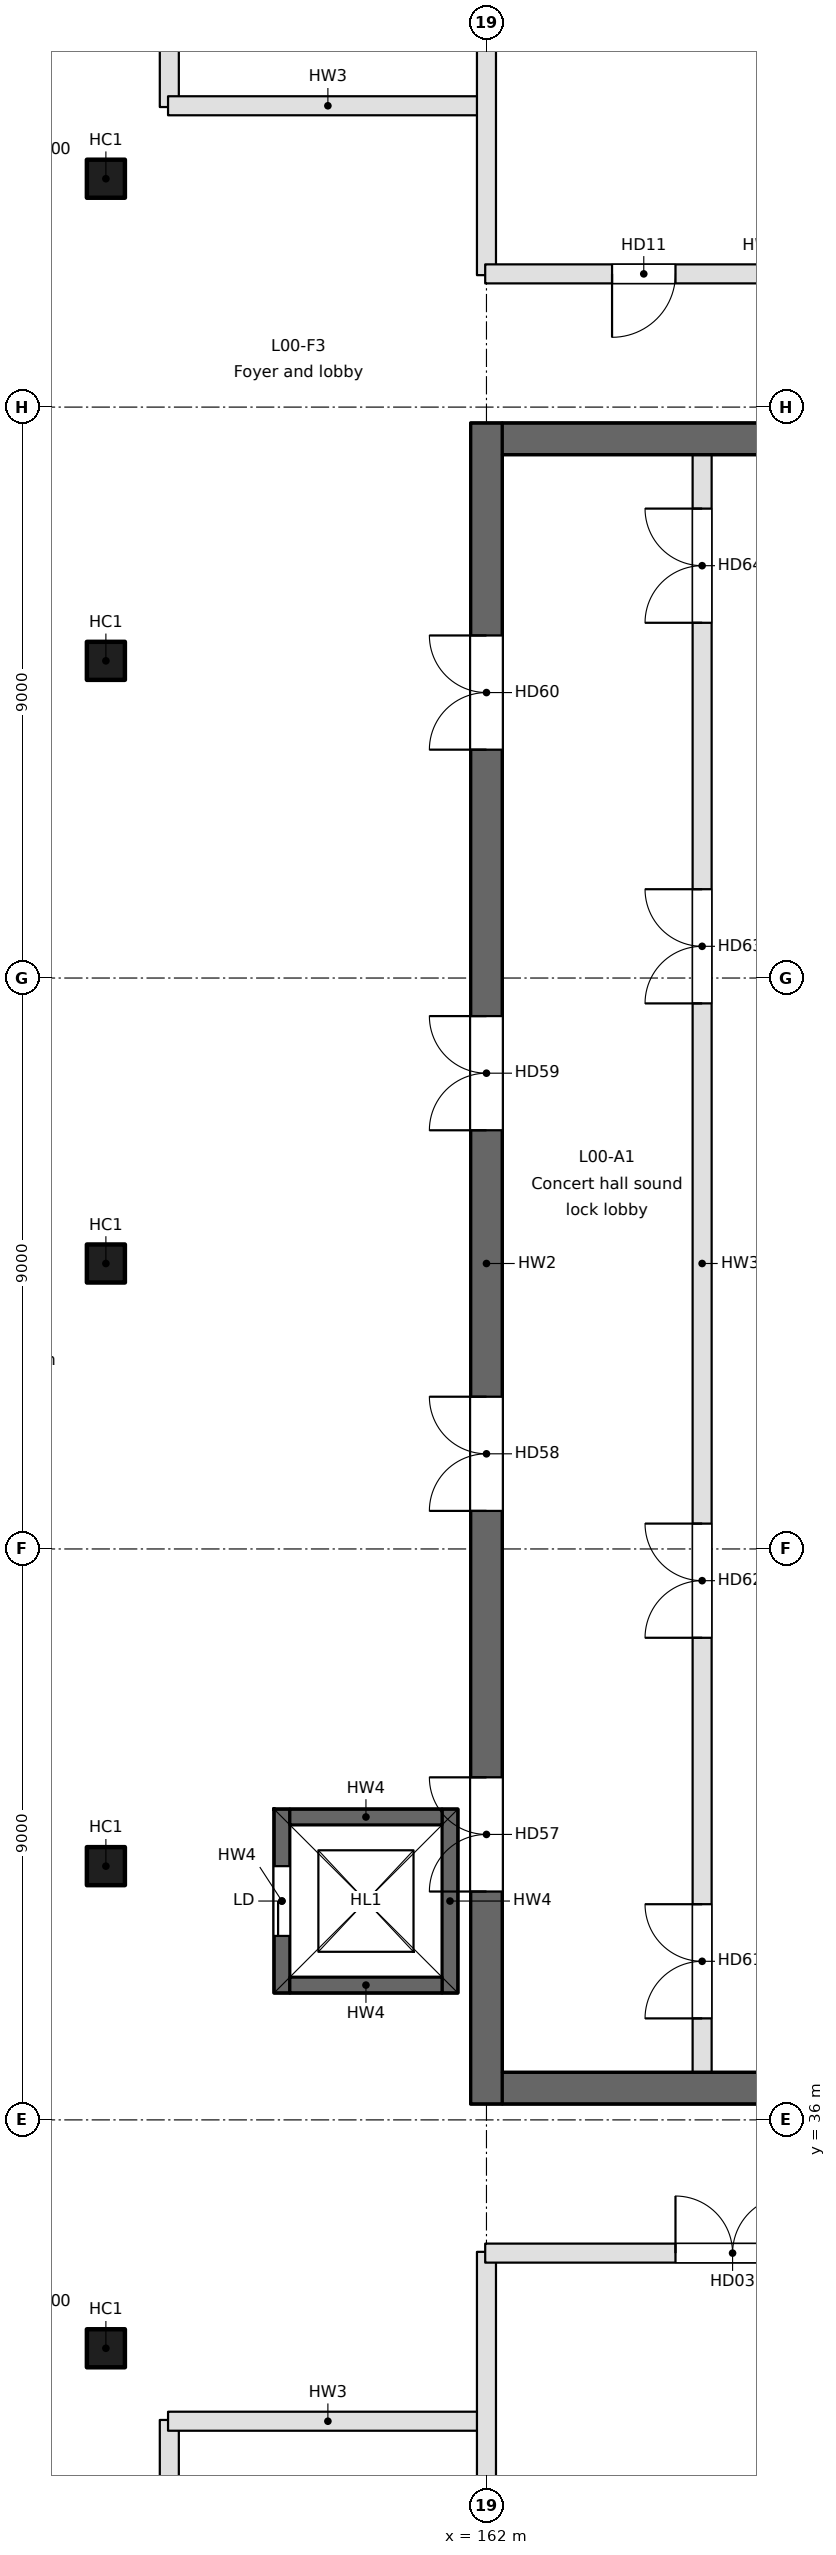
"""IFC4 building model, lengths in metres.
Left out: names, types, materials, properties, quantities, classifications, styles, units other than length and angle.
Written with IfcOpenShell. Run it as: python <this file> out.ifc"""

import sys

from ifc_helpers import new_model, si_unit, direction, frame, frame_2d, origin, origin_2d, place, context, subcontext, project, spatial, rectangle, extrude, element, fill, save


model = new_model("IFC4")
c1 = context("Model", 3, precision=1e-05, world=origin(), true_north=direction((0.0, 1.0)))
c2 = subcontext(c1, "Body", "Model", "MODEL_VIEW")
j1 = project(units=[si_unit("LENGTHUNIT", "METRE"), si_unit("PLANEANGLEUNIT", "RADIAN")], contexts=[c1])
p1 = place(None, origin())
s1 = spatial("IfcSite", under=j1, at=p1, CompositionType="ELEMENT")
p2 = place(p1, origin())
s2 = spatial("IfcBuilding", under=s1, at=p2, CompositionType="ELEMENT")
p3 = place(p2, origin())
s3 = spatial("IfcBuildingStorey", under=s2, at=p3, CompositionType="ELEMENT", Elevation=0.0)
for number, where, z_axis, x_axis in (
    (1, (156.0, 32.4, -1.8), (0.0, 0.0, 1.0), (1.0, 0.0, 0.0)),
    (2, (156.0, 40.0, -1.8), (0.0, 0.0, 1.0), (1.0, 0.0, 0.0)),
    (3, (156.0, 49.5, -1.8), (0.0, 0.0, 1.0), (1.0, 0.0, 0.0)),
    (4, (156.0, 59.0, -1.8), (0.0, 0.0, 1.0), (1.0, 0.0, 0.0)),
    (5, (156.0, 66.6, -1.8), (0.0, 0.0, 1.0), (1.0, 0.0, 0.0)),
):
    element("IfcColumn", number, at=place(p3, frame(where, z_axis=z_axis, x_axis=x_axis)), inside=s3, PredefinedType="COLUMN", context=c2, shape_type="SweptSolid", body=[
        extrude(rectangle(XDim=0.6, YDim=0.6, at=origin_2d()), origin(), (0.0, 0.0, 1.0), 7.8),
    ])
p4 = place(p3, frame((162.0, 36.25, -1.8), z_axis=(0.0, 0.0, 1.0), x_axis=(0.0, 1.0, 0.0)))
e6 = element("IfcWall", 6, at=p4, inside=s3, PredefinedType="SOLIDWALL", context=c2, shape_type="SweptSolid", body=[
    extrude(rectangle(XDim=26.5, YDim=0.5, at=frame_2d((13.25, 0.0))), origin(), (0.0, 0.0, 1.0), 7.45),
])
p5 = place(p4, frame((3.35, 0.0, 1.8)))
e7 = element("IfcOpeningElement", 7, at=p5, cuts=e6, PredefinedType="OPENING", context=c2, shape_type="SweptSolid", body=[
    extrude(rectangle(XDim=1.8, YDim=2.4, at=frame_2d((0.9, 1.2))), frame((0.0, 0.25, 0.0), z_axis=(0.0, -1.0, 0.0), x_axis=(1.0, 0.0, 0.0)), (0.0, 0.0, 1.0), 0.5),
])
p6 = place(p4, frame((9.35, 0.0, 1.8)))
e8 = element("IfcOpeningElement", 8, at=p6, cuts=e6, PredefinedType="OPENING", context=c2, shape_type="SweptSolid", body=[
    extrude(rectangle(XDim=1.8, YDim=2.4, at=frame_2d((0.9, 1.2))), frame((0.0, 0.25, 0.0), z_axis=(0.0, -1.0, 0.0), x_axis=(1.0, 0.0, 0.0)), (0.0, 0.0, 1.0), 0.5),
])
p7 = place(p4, frame((15.35, 0.0, 1.8)))
e9 = element("IfcOpeningElement", 9, at=p7, cuts=e6, PredefinedType="OPENING", context=c2, shape_type="SweptSolid", body=[
    extrude(rectangle(XDim=1.8, YDim=2.4, at=frame_2d((0.9, 1.2))), frame((0.0, 0.25, 0.0), z_axis=(0.0, -1.0, 0.0), x_axis=(1.0, 0.0, 0.0)), (0.0, 0.0, 1.0), 0.5),
])
p8 = place(p4, frame((21.35, 0.0, 1.8)))
e10 = element("IfcOpeningElement", 10, at=p8, cuts=e6, PredefinedType="OPENING", context=c2, shape_type="SweptSolid", body=[
    extrude(rectangle(XDim=1.8, YDim=2.4, at=frame_2d((0.9, 1.2))), frame((0.0, 0.25, 0.0), z_axis=(0.0, -1.0, 0.0), x_axis=(1.0, 0.0, 0.0)), (0.0, 0.0, 1.0), 0.5),
])
p9 = place(p3, frame((209.6, 36.5, -1.8), z_axis=(0.0, 0.0, 1.0), x_axis=(-1.0, 0.0, 0.0)))
e11 = element("IfcWall", 11, at=p9, inside=s3, PredefinedType="SOLIDWALL", context=c2, shape_type="SweptSolid", body=[
    extrude(rectangle(XDim=47.35, YDim=0.5, at=frame_2d((23.675, 0.0))), origin(), (0.0, 0.0, 1.0), 7.45),
])
p10 = place(p9, frame((40.7, 0.0, 1.8)))
e12 = element("IfcOpeningElement", 12, at=p10, cuts=e11, PredefinedType="OPENING", context=c2, shape_type="SweptSolid", body=[
    extrude(rectangle(XDim=1.8, YDim=2.4, at=frame_2d((0.9, 1.2))), frame((0.0, 0.25, 0.0), z_axis=(0.0, -1.0, 0.0), x_axis=(1.0, 0.0, 0.0)), (0.0, 0.0, 1.0), 0.5),
])
p11 = place(p9, frame((37.2, 0.0, 1.8)))
e13 = element("IfcOpeningElement", 13, at=p11, cuts=e11, PredefinedType="OPENING", context=c2, shape_type="SweptSolid", body=[
    extrude(rectangle(XDim=1.8, YDim=2.4, at=frame_2d((0.9, 1.2))), frame((0.0, 0.25, 0.0), z_axis=(0.0, -1.0, 0.0), x_axis=(1.0, 0.0, 0.0)), (0.0, 0.0, 1.0), 0.5),
])
p12 = place(p9, frame((33.7, 0.0, 1.8)))
e14 = element("IfcOpeningElement", 14, at=p12, cuts=e11, PredefinedType="OPENING", context=c2, shape_type="SweptSolid", body=[
    extrude(rectangle(XDim=1.8, YDim=2.4, at=frame_2d((0.9, 1.2))), frame((0.0, 0.25, 0.0), z_axis=(0.0, -1.0, 0.0), x_axis=(1.0, 0.0, 0.0)), (0.0, 0.0, 1.0), 0.5),
])
p13 = place(p9, frame((12.7, 0.0, 1.8)))
e15 = element("IfcOpeningElement", 15, at=p13, cuts=e11, PredefinedType="OPENING", context=c2, shape_type="SweptSolid", body=[
    extrude(rectangle(XDim=1.8, YDim=2.1, at=frame_2d((0.9, 1.05))), frame((0.0, 0.25, 0.0), z_axis=(0.0, -1.0, 0.0), x_axis=(1.0, 0.0, 0.0)), (0.0, 0.0, 1.0), 0.5),
])
p14 = place(p9, frame((4.7, 0.0, 1.8)))
e16 = element("IfcOpeningElement", 16, at=p14, cuts=e11, PredefinedType="OPENING", context=c2, shape_type="SweptSolid", body=[
    extrude(rectangle(XDim=1.8, YDim=2.1, at=frame_2d((0.9, 1.05))), frame((0.0, 0.25, 0.0), z_axis=(0.0, -1.0, 0.0), x_axis=(1.0, 0.0, 0.0)), (0.0, 0.0, 1.0), 0.5),
])
p15 = place(p3, frame((162.25, 62.5, -1.8), z_axis=(0.0, 0.0, 1.0), x_axis=(1.0, 0.0, 0.0)))
e17 = element("IfcWall", 17, at=p15, inside=s3, PredefinedType="SOLIDWALL", context=c2, shape_type="SweptSolid", body=[
    extrude(rectangle(XDim=47.35, YDim=0.5, at=frame_2d((23.675, 0.0))), origin(), (0.0, 0.0, 1.0), 7.45),
])
p16 = place(p15, frame((4.85, 0.0, 1.8)))
e18 = element("IfcOpeningElement", 18, at=p16, cuts=e17, PredefinedType="OPENING", context=c2, shape_type="SweptSolid", body=[
    extrude(rectangle(XDim=1.8, YDim=2.4, at=frame_2d((0.9, 1.2))), frame((0.0, 0.25, 0.0), z_axis=(0.0, -1.0, 0.0), x_axis=(1.0, 0.0, 0.0)), (0.0, 0.0, 1.0), 0.5),
])
p17 = place(p15, frame((8.35, 0.0, 1.8)))
e19 = element("IfcOpeningElement", 19, at=p17, cuts=e17, PredefinedType="OPENING", context=c2, shape_type="SweptSolid", body=[
    extrude(rectangle(XDim=1.8, YDim=2.4, at=frame_2d((0.9, 1.2))), frame((0.0, 0.25, 0.0), z_axis=(0.0, -1.0, 0.0), x_axis=(1.0, 0.0, 0.0)), (0.0, 0.0, 1.0), 0.5),
])
p18 = place(p15, frame((11.85, 0.0, 1.8)))
e20 = element("IfcOpeningElement", 20, at=p18, cuts=e17, PredefinedType="OPENING", context=c2, shape_type="SweptSolid", body=[
    extrude(rectangle(XDim=1.8, YDim=2.4, at=frame_2d((0.9, 1.2))), frame((0.0, 0.25, 0.0), z_axis=(0.0, -1.0, 0.0), x_axis=(1.0, 0.0, 0.0)), (0.0, 0.0, 1.0), 0.5),
])
p19 = place(p15, frame((32.85, 0.0, 1.8)))
e21 = element("IfcOpeningElement", 21, at=p19, cuts=e17, PredefinedType="OPENING", context=c2, shape_type="SweptSolid", body=[
    extrude(rectangle(XDim=1.8, YDim=2.1, at=frame_2d((0.9, 1.05))), frame((0.0, 0.25, 0.0), z_axis=(0.0, -1.0, 0.0), x_axis=(1.0, 0.0, 0.0)), (0.0, 0.0, 1.0), 0.5),
])
p20 = place(p15, frame((40.85, 0.0, 1.8)))
e22 = element("IfcOpeningElement", 22, at=p20, cuts=e17, PredefinedType="OPENING", context=c2, shape_type="SweptSolid", body=[
    extrude(rectangle(XDim=1.8, YDim=2.1, at=frame_2d((0.9, 1.05))), frame((0.0, 0.25, 0.0), z_axis=(0.0, -1.0, 0.0), x_axis=(1.0, 0.0, 0.0)), (0.0, 0.0, 1.0), 0.5),
])
p21 = place(p3, frame((165.4, 36.75, 0.0), z_axis=(0.0, 0.0, 1.0), x_axis=(0.0, 1.0, 0.0)))
e23 = element("IfcWall", 23, at=p21, inside=s3, PredefinedType="PARTITIONING", context=c2, shape_type="SweptSolid", body=[
    extrude(rectangle(XDim=25.5, YDim=0.3, at=frame_2d((12.75, 0.0))), origin(), (0.0, 0.0, 1.0), 5.65),
])
p22 = place(p21, frame((0.85, 0.0, 0.0)))
e24 = element("IfcOpeningElement", 24, at=p22, cuts=e23, PredefinedType="OPENING", context=c2, shape_type="SweptSolid", body=[
    extrude(rectangle(XDim=1.8, YDim=2.4, at=frame_2d((0.9, 1.2))), frame((0.0, 0.15, 0.0), z_axis=(0.0, -1.0, 0.0), x_axis=(1.0, 0.0, 0.0)), (0.0, 0.0, 1.0), 0.3),
])
p23 = place(p21, frame((6.85, 0.0, 0.0)))
e25 = element("IfcOpeningElement", 25, at=p23, cuts=e23, PredefinedType="OPENING", context=c2, shape_type="SweptSolid", body=[
    extrude(rectangle(XDim=1.8, YDim=2.4, at=frame_2d((0.9, 1.2))), frame((0.0, 0.15, 0.0), z_axis=(0.0, -1.0, 0.0), x_axis=(1.0, 0.0, 0.0)), (0.0, 0.0, 1.0), 0.3),
])
p24 = place(p21, frame((16.85, 0.0, 0.0)))
e26 = element("IfcOpeningElement", 26, at=p24, cuts=e23, PredefinedType="OPENING", context=c2, shape_type="SweptSolid", body=[
    extrude(rectangle(XDim=1.8, YDim=2.4, at=frame_2d((0.9, 1.2))), frame((0.0, 0.15, 0.0), z_axis=(0.0, -1.0, 0.0), x_axis=(1.0, 0.0, 0.0)), (0.0, 0.0, 1.0), 0.3),
])
p25 = place(p21, frame((22.85, 0.0, 0.0)))
e27 = element("IfcOpeningElement", 27, at=p25, cuts=e23, PredefinedType="OPENING", context=c2, shape_type="SweptSolid", body=[
    extrude(rectangle(XDim=1.8, YDim=2.4, at=frame_2d((0.9, 1.2))), frame((0.0, 0.15, 0.0), z_axis=(0.0, -1.0, 0.0), x_axis=(1.0, 0.0, 0.0)), (0.0, 0.0, 1.0), 0.3),
])
p26 = place(p3, frame((157.0, 22.73, 0.0), z_axis=(0.0, 0.0, 1.0), x_axis=(0.0, 1.0, 0.0)))
e28 = element("IfcWall", 28, at=p26, inside=s3, PredefinedType="PARTITIONING", context=c2, shape_type="SweptSolid", body=[
    extrude(rectangle(XDim=8.54, YDim=0.3, at=frame_2d((4.27, 0.0))), origin(), (0.0, 0.0, 1.0), 5.65),
])
p27 = place(p26, frame((3.75, 0.0, 0.0)))
e29 = element("IfcOpeningElement", 29, at=p27, cuts=e28, PredefinedType="OPENING", context=c2, shape_type="SweptSolid", body=[
    extrude(rectangle(XDim=1.0, YDim=2.1, at=frame_2d((0.5, 1.05))), frame((0.0, 0.15, 0.0), z_axis=(0.0, -1.0, 0.0), x_axis=(1.0, 0.0, 0.0)), (0.0, 0.0, 1.0), 0.3),
])
p28 = place(p3, frame((157.0, 67.73, 0.0), z_axis=(0.0, 0.0, 1.0), x_axis=(0.0, 1.0, 0.0)))
e30 = element("IfcWall", 30, at=p28, inside=s3, PredefinedType="PARTITIONING", context=c2, shape_type="SweptSolid", body=[
    extrude(rectangle(XDim=8.54, YDim=0.3, at=frame_2d((4.27, 0.0))), origin(), (0.0, 0.0, 1.0), 5.65),
])
p29 = place(p28, frame((3.75, 0.0, 0.0)))
e31 = element("IfcOpeningElement", 31, at=p29, cuts=e30, PredefinedType="OPENING", context=c2, shape_type="SweptSolid", body=[
    extrude(rectangle(XDim=1.0, YDim=2.1, at=frame_2d((0.5, 1.05))), frame((0.0, 0.15, 0.0), z_axis=(0.0, -1.0, 0.0), x_axis=(1.0, 0.0, 0.0)), (0.0, 0.0, 1.0), 0.3),
])
for number, where, z_axis, x_axis in (
    (32, (156.98, 31.25, 0.0), (0.0, 0.0, 1.0), (1.0, 0.0, 0.0)),
    (33, (162.02, 67.75, 0.0), (0.0, 0.0, 1.0), (-1.0, 0.0, 0.0)),
):
    element("IfcWall", number, at=place(p3, frame(where, z_axis=z_axis, x_axis=x_axis)), inside=s3, PredefinedType="PARTITIONING", context=c2, shape_type="SweptSolid", body=[
        extrude(rectangle(XDim=5.04, YDim=0.3, at=frame_2d((2.52, 0.0))), origin(), (0.0, 0.0, 1.0), 5.65),
    ])
for number, where, z_axis, x_axis in (
    (34, (162.0, 22.73, 0.0), (0.0, 0.0, 1.0), (0.0, 1.0, 0.0)),
    (35, (162.0, 65.08, 0.0), (0.0, 0.0, 1.0), (0.0, 1.0, 0.0)),
):
    element("IfcWall", number, at=place(p3, frame(where, z_axis=z_axis, x_axis=x_axis)), inside=s3, PredefinedType="PARTITIONING", context=c2, shape_type="SweptSolid", body=[
        extrude(rectangle(XDim=11.19, YDim=0.3, at=frame_2d((5.595, 0.0))), origin(), (0.0, 0.0, 1.0), 5.65),
    ])
p30 = place(p3, frame((161.98, 33.9, 0.0), z_axis=(0.0, 0.0, 1.0), x_axis=(1.0, 0.0, 0.0)))
e36 = element("IfcWall", 36, at=p30, inside=s3, PredefinedType="PARTITIONING", context=c2, shape_type="SweptSolid", body=[
    extrude(rectangle(XDim=8.72, YDim=0.3, at=frame_2d((4.36, 0.0))), origin(), (0.0, 0.0, 1.0), 5.65),
])
p31 = place(p30, frame((3.0, 0.0, 0.0)))
e37 = element("IfcOpeningElement", 37, at=p31, cuts=e36, PredefinedType="OPENING", context=c2, shape_type="SweptSolid", body=[
    extrude(rectangle(XDim=1.8, YDim=2.1, at=frame_2d((0.9, 1.05))), frame((0.0, 0.15, 0.0), z_axis=(0.0, -1.0, 0.0), x_axis=(1.0, 0.0, 0.0)), (0.0, 0.0, 1.0), 0.3),
])
p32 = place(p3, frame((170.7, 65.1, 0.0), z_axis=(0.0, 0.0, 1.0), x_axis=(-1.0, 0.0, 0.0)))
e38 = element("IfcWall", 38, at=p32, inside=s3, PredefinedType="PARTITIONING", context=c2, shape_type="SweptSolid", body=[
    extrude(rectangle(XDim=8.72, YDim=0.3, at=frame_2d((4.36, 0.0))), origin(), (0.0, 0.0, 1.0), 5.65),
])
p33 = place(p32, frame((5.72, 0.0, 0.0)))
e39 = element("IfcOpeningElement", 39, at=p33, cuts=e38, PredefinedType="OPENING", context=c2, shape_type="SweptSolid", body=[
    extrude(rectangle(XDim=1.0, YDim=2.1, at=frame_2d((0.5, 1.05))), frame((0.0, 0.15, 0.0), z_axis=(0.0, -1.0, 0.0), x_axis=(1.0, 0.0, 0.0)), (0.0, 0.0, 1.0), 0.3),
])
p34 = place(p32, frame((1.47, 0.0, 0.0)))
e40 = element("IfcOpeningElement", 40, at=p34, cuts=e38, PredefinedType="OPENING", context=c2, shape_type="SweptSolid", body=[
    extrude(rectangle(XDim=1.0, YDim=2.1, at=frame_2d((0.5, 1.05))), frame((0.0, 0.15, 0.0), z_axis=(0.0, -1.0, 0.0), x_axis=(1.0, 0.0, 0.0)), (0.0, 0.0, 1.0), 0.3),
])
p35 = place(p3, frame((158.775, 38.0, -1.8), z_axis=(0.0, 0.0, 1.0), x_axis=(0.0, 1.0, 0.0)))
e41 = element("IfcWall", 41, at=p35, inside=s3, PredefinedType="SOLIDWALL", context=c2, shape_type="SweptSolid", body=[
    extrude(rectangle(XDim=2.9, YDim=0.25, at=frame_2d((1.45, 0.0))), origin(), (0.0, 0.0, 1.0), 7.45),
])
p36 = place(p35, frame((0.9, 0.0, 1.8)))
e42 = element("IfcOpeningElement", 42, at=p36, cuts=e41, PredefinedType="OPENING", context=c2, shape_type="SweptSolid", body=[
    extrude(rectangle(XDim=1.1, YDim=2.1, at=frame_2d((0.55, 1.05))), frame((0.0, 0.125, 0.0), z_axis=(0.0, -1.0, 0.0), x_axis=(1.0, 0.0, 0.0)), (0.0, 0.0, 1.0), 0.25),
])
p37 = place(p3, frame((161.425, 40.9, -1.8), z_axis=(0.0, 0.0, 1.0), x_axis=(0.0, -1.0, 0.0)))
e43 = element("IfcWall", 43, at=p37, inside=s3, PredefinedType="SOLIDWALL", context=c2, shape_type="SweptSolid", body=[
    extrude(rectangle(XDim=2.9, YDim=0.25, at=frame_2d((1.45, 0.0))), origin(), (0.0, 0.0, 1.0), 7.45),
])
for number, where, z_axis, x_axis in (
    (44, (161.3, 38.125, -1.8), (0.0, 0.0, 1.0), (-1.0, 0.0, 0.0)),
    (45, (158.9, 40.775, -1.8), (0.0, 0.0, 1.0), (1.0, 0.0, 0.0)),
):
    element("IfcWall", number, at=place(p3, frame(where, z_axis=z_axis, x_axis=x_axis)), inside=s3, PredefinedType="SOLIDWALL", context=c2, shape_type="SweptSolid", body=[
        extrude(rectangle(XDim=2.4, YDim=0.25, at=frame_2d((1.2, 0.0))), origin(), (0.0, 0.0, 1.0), 7.45),
    ])
p38 = place(p31, origin())
e46 = element("IfcDoor", 46, at=p38, inside=s3, OperationType="DOUBLE_DOOR_SINGLE_SWING", PredefinedType="DOOR", context=c2, shape_type="SweptSolid", body=[
    extrude(rectangle(XDim=1.8, YDim=2.1, at=frame_2d((0.9, 1.05))), frame((0.0, 0.025, 0.0), z_axis=(0.0, -1.0, 0.0), x_axis=(1.0, 0.0, 0.0)), (0.0, 0.0, 1.0), 0.05),
])
fill(e37, e46)
p39 = place(p33, origin())
e47 = element("IfcDoor", 47, at=p39, inside=s3, OperationType="SINGLE_SWING_RIGHT", PredefinedType="DOOR", context=c2, shape_type="SweptSolid", body=[
    extrude(rectangle(XDim=1.0, YDim=2.1, at=frame_2d((0.5, 1.05))), frame((0.0, 0.025, 0.0), z_axis=(0.0, -1.0, 0.0), x_axis=(1.0, 0.0, 0.0)), (0.0, 0.0, 1.0), 0.05),
])
fill(e39, e47)
p40 = place(p5, origin())
e48 = element("IfcDoor", 48, at=p40, inside=s3, OperationType="DOUBLE_DOOR_SINGLE_SWING", PredefinedType="DOOR", context=c2, shape_type="SweptSolid", body=[
    extrude(rectangle(XDim=1.8, YDim=2.4, at=frame_2d((0.9, 1.2))), frame((0.0, 0.025, 0.0), z_axis=(0.0, -1.0, 0.0), x_axis=(1.0, 0.0, 0.0)), (0.0, 0.0, 1.0), 0.05),
])
fill(e7, e48)
p41 = place(p6, origin())
e49 = element("IfcDoor", 49, at=p41, inside=s3, OperationType="DOUBLE_DOOR_SINGLE_SWING", PredefinedType="DOOR", context=c2, shape_type="SweptSolid", body=[
    extrude(rectangle(XDim=1.8, YDim=2.4, at=frame_2d((0.9, 1.2))), frame((0.0, 0.025, 0.0), z_axis=(0.0, -1.0, 0.0), x_axis=(1.0, 0.0, 0.0)), (0.0, 0.0, 1.0), 0.05),
])
fill(e8, e49)
p42 = place(p7, origin())
e50 = element("IfcDoor", 50, at=p42, inside=s3, OperationType="DOUBLE_DOOR_SINGLE_SWING", PredefinedType="DOOR", context=c2, shape_type="SweptSolid", body=[
    extrude(rectangle(XDim=1.8, YDim=2.4, at=frame_2d((0.9, 1.2))), frame((0.0, 0.025, 0.0), z_axis=(0.0, -1.0, 0.0), x_axis=(1.0, 0.0, 0.0)), (0.0, 0.0, 1.0), 0.05),
])
fill(e9, e50)
p43 = place(p8, origin())
e51 = element("IfcDoor", 51, at=p43, inside=s3, OperationType="DOUBLE_DOOR_SINGLE_SWING", PredefinedType="DOOR", context=c2, shape_type="SweptSolid", body=[
    extrude(rectangle(XDim=1.8, YDim=2.4, at=frame_2d((0.9, 1.2))), frame((0.0, 0.025, 0.0), z_axis=(0.0, -1.0, 0.0), x_axis=(1.0, 0.0, 0.0)), (0.0, 0.0, 1.0), 0.05),
])
fill(e10, e51)
p44 = place(p22, origin())
e52 = element("IfcDoor", 52, at=p44, inside=s3, OperationType="DOUBLE_DOOR_SINGLE_SWING", PredefinedType="DOOR", context=c2, shape_type="SweptSolid", body=[
    extrude(rectangle(XDim=1.8, YDim=2.4, at=frame_2d((0.9, 1.2))), frame((0.0, 0.025, 0.0), z_axis=(0.0, -1.0, 0.0), x_axis=(1.0, 0.0, 0.0)), (0.0, 0.0, 1.0), 0.05),
])
fill(e24, e52)
p45 = place(p23, origin())
e53 = element("IfcDoor", 53, at=p45, inside=s3, OperationType="DOUBLE_DOOR_SINGLE_SWING", PredefinedType="DOOR", context=c2, shape_type="SweptSolid", body=[
    extrude(rectangle(XDim=1.8, YDim=2.4, at=frame_2d((0.9, 1.2))), frame((0.0, 0.025, 0.0), z_axis=(0.0, -1.0, 0.0), x_axis=(1.0, 0.0, 0.0)), (0.0, 0.0, 1.0), 0.05),
])
fill(e25, e53)
p46 = place(p24, origin())
e54 = element("IfcDoor", 54, at=p46, inside=s3, OperationType="DOUBLE_DOOR_SINGLE_SWING", PredefinedType="DOOR", context=c2, shape_type="SweptSolid", body=[
    extrude(rectangle(XDim=1.8, YDim=2.4, at=frame_2d((0.9, 1.2))), frame((0.0, 0.025, 0.0), z_axis=(0.0, -1.0, 0.0), x_axis=(1.0, 0.0, 0.0)), (0.0, 0.0, 1.0), 0.05),
])
fill(e26, e54)
p47 = place(p25, origin())
e55 = element("IfcDoor", 55, at=p47, inside=s3, OperationType="DOUBLE_DOOR_SINGLE_SWING", PredefinedType="DOOR", context=c2, shape_type="SweptSolid", body=[
    extrude(rectangle(XDim=1.8, YDim=2.4, at=frame_2d((0.9, 1.2))), frame((0.0, 0.025, 0.0), z_axis=(0.0, -1.0, 0.0), x_axis=(1.0, 0.0, 0.0)), (0.0, 0.0, 1.0), 0.05),
])
fill(e27, e55)
p48 = place(p36, origin())
e56 = element("IfcDoor", 56, at=p48, inside=s3, OperationType="SLIDING_TO_LEFT", PredefinedType="DOOR", context=c2, shape_type="SweptSolid", body=[
    extrude(rectangle(XDim=1.1, YDim=2.1, at=frame_2d((0.55, 1.05))), frame((0.0, 0.025, 0.0), z_axis=(0.0, -1.0, 0.0), x_axis=(1.0, 0.0, 0.0)), (0.0, 0.0, 1.0), 0.05),
])
fill(e42, e56)
save(model, sys.argv[1])
